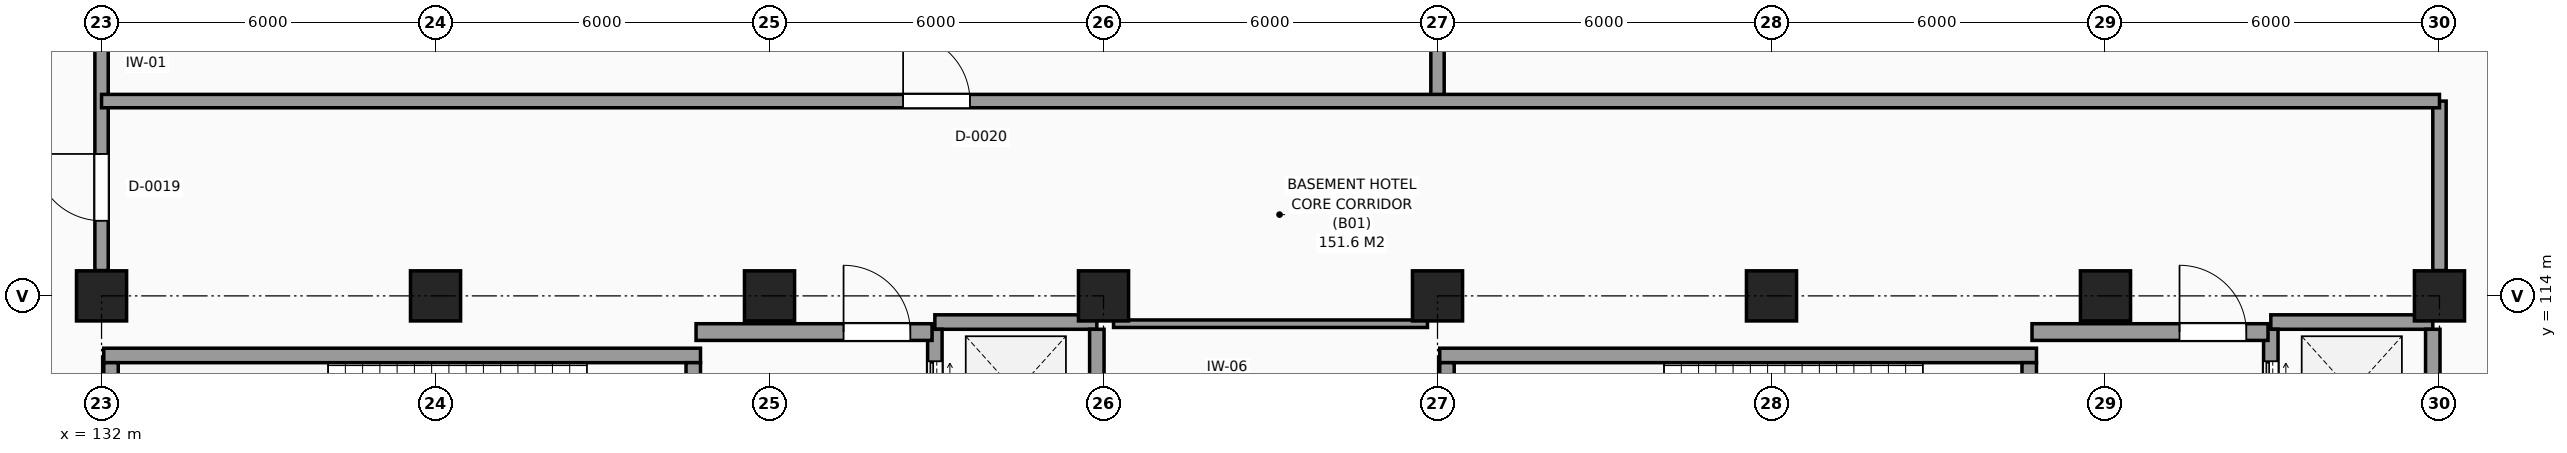
"""IFC4 building model, lengths in metres.
Left out: names, types, materials, properties, quantities, classifications, styles, units other than length and angle.
Written with IfcOpenShell. Run it as: python <this file> out.ifc"""

import sys

from ifc_helpers import new_model, si_unit, direction, frame, frame_2d, origin, origin_2d, place, context, subcontext, project, spatial, rectangle, extrude, element, fill, save


model = new_model("IFC4")
c1 = context("Model", 3, precision=1e-05, world=origin(), true_north=direction((0.0, 1.0)))
c2 = subcontext(c1, "Body", "Model", "MODEL_VIEW")
j1 = project(units=[si_unit("LENGTHUNIT", "METRE"), si_unit("PLANEANGLEUNIT", "RADIAN")], contexts=[c1])
p1 = place(None, origin())
s1 = spatial("IfcSite", under=j1, at=p1, CompositionType="ELEMENT")
p2 = place(p1, origin())
s2 = spatial("IfcBuilding", under=s1, at=p2, CompositionType="ELEMENT")
p3 = place(p2, frame((0.0, 0.0, -4.8)))
s3 = spatial("IfcBuildingStorey", under=s2, at=p3, CompositionType="ELEMENT", Elevation=-4.8)
for number, where, z_axis, x_axis in (
    (1, (132.0, 114.0, 0.0), (0.0, 0.0, 1.0), (1.0, 0.0, 0.0)),
    (2, (138.0, 114.0, 0.0), (0.0, 0.0, 1.0), (1.0, 0.0, 0.0)),
    (3, (144.0, 114.0, 0.0), (0.0, 0.0, 1.0), (1.0, 0.0, 0.0)),
    (4, (150.0, 114.0, 0.0), (0.0, 0.0, 1.0), (1.0, 0.0, 0.0)),
    (5, (156.0, 114.0, 0.0), (0.0, 0.0, 1.0), (1.0, 0.0, 0.0)),
    (6, (162.0, 114.0, 0.0), (0.0, 0.0, 1.0), (1.0, 0.0, 0.0)),
    (7, (168.0, 114.0, 0.0), (0.0, 0.0, 1.0), (1.0, 0.0, 0.0)),
    (8, (174.0, 114.0, 0.0), (0.0, 0.0, 1.0), (1.0, 0.0, 0.0)),
):
    element("IfcColumn", number, at=place(p3, frame(where, z_axis=z_axis, x_axis=x_axis)), inside=s3, PredefinedType="COLUMN", context=c2, shape_type="SweptSolid", body=[
        extrude(rectangle(XDim=0.9, YDim=0.9, at=origin_2d()), origin(), (0.0, 0.0, 1.0), 4.8),
    ])
p4 = place(p3, frame((156.04, 112.93, -0.5), z_axis=(0.0, 0.0, 1.0), x_axis=(1.0, 0.0, 0.0)))
e9 = element("IfcWall", 9, at=p4, inside=s3, PredefinedType="SHEAR", context=c2, shape_type="SweptSolid", body=[
    extrude(rectangle(XDim=10.72, YDim=0.26, at=frame_2d((5.36, 0.0))), origin(), (0.0, 0.0, 1.0), 5.3),
])
p5 = place(p3, frame((156.17, 109.2, -0.5), z_axis=(0.0, 0.0, 1.0), x_axis=(0.0, 1.0, 0.0)))
e10 = element("IfcWall", 10, at=p5, inside=s3, PredefinedType="SHEAR", context=c2, shape_type="SweptSolid", body=[
    extrude(rectangle(XDim=3.6, YDim=0.26, at=frame_2d((1.8, 0.0))), origin(), (0.0, 0.0, 1.0), 5.3),
])
p6 = place(p3, frame((166.63, 109.2, -0.5), z_axis=(0.0, 0.0, 1.0), x_axis=(0.0, 1.0, 0.0)))
e11 = element("IfcWall", 11, at=p6, inside=s3, PredefinedType="SHEAR", context=c2, shape_type="SweptSolid", body=[
    extrude(rectangle(XDim=3.6, YDim=0.26, at=frame_2d((1.8, 0.0))), origin(), (0.0, 0.0, 1.0), 5.3),
])
p7 = place(p6, frame((1.25, 0.0, 0.5)))
e12 = element("IfcOpeningElement", 12, at=p7, cuts=e11, PredefinedType="OPENING", context=c2, shape_type="SweptSolid", body=[
    extrude(rectangle(XDim=1.1, YDim=2.15, at=frame_2d((0.55, 1.075))), frame((0.0, 0.14, 0.0), z_axis=(0.0, -1.0, 0.0), x_axis=(1.0, 0.0, 0.0)), (0.0, 0.0, 1.0), 0.28),
])
p8 = place(p3, frame((170.97, 113.53, -0.5), z_axis=(0.0, 0.0, 1.0), x_axis=(1.0, 0.0, 0.0)))
e13 = element("IfcWall", 13, at=p8, inside=s3, PredefinedType="SHEAR", context=c2, shape_type="SweptSolid", body=[
    extrude(rectangle(XDim=2.91, YDim=0.26, at=frame_2d((1.455, 0.0))), origin(), (0.0, 0.0, 1.0), 5.3),
])
p9 = place(p3, frame((173.88, 111.15, -0.5), z_axis=(0.0, 0.0, 1.0), x_axis=(0.0, 1.0, 0.0)))
e14 = element("IfcWall", 14, at=p9, inside=s3, PredefinedType="SHEAR", context=c2, shape_type="SweptSolid", body=[
    extrude(rectangle(XDim=2.25, YDim=0.26, at=frame_2d((1.125, 0.0))), origin(), (0.0, 0.0, 1.0), 5.3),
])
p10 = place(p3, frame((170.97, 111.15, -0.5), z_axis=(0.0, 0.0, 1.0), x_axis=(0.0, 1.0, 0.0)))
e15 = element("IfcWall", 15, at=p10, inside=s3, PredefinedType="SHEAR", context=c2, shape_type="SweptSolid", body=[
    extrude(rectangle(XDim=2.25, YDim=0.26, at=frame_2d((1.125, 0.0))), origin(), (0.0, 0.0, 1.0), 5.3),
])
p11 = place(p10, frame((0.575, 0.0, 0.5)))
e16 = element("IfcOpeningElement", 16, at=p11, cuts=e15, PredefinedType="OPENING", context=c2, shape_type="SweptSolid", body=[
    extrude(rectangle(XDim=1.1, YDim=2.2, at=frame_2d((0.55, 1.1))), frame((0.0, 0.14, 0.0), z_axis=(0.0, -1.0, 0.0), x_axis=(1.0, 0.0, 0.0)), (0.0, 0.0, 1.0), 0.28),
])
p12 = place(p3, frame((166.68, 113.35, -0.5), z_axis=(0.0, 0.0, 1.0), x_axis=(1.0, 0.0, 0.0)))
e17 = element("IfcWall", 17, at=p12, inside=s3, PredefinedType="SHEAR", context=c2, shape_type="SweptSolid", body=[
    extrude(rectangle(XDim=4.24, YDim=0.3, at=frame_2d((2.12, 0.0))), origin(), (0.0, 0.0, 1.0), 5.3),
])
p13 = place(p12, frame((2.65, 0.0, 0.5)))
e18 = element("IfcOpeningElement", 18, at=p13, cuts=e17, PredefinedType="OPENING", context=c2, shape_type="SweptSolid", body=[
    extrude(rectangle(XDim=1.2, YDim=2.2, at=frame_2d((0.6, 1.1))), frame((0.0, 0.16, 0.0), z_axis=(0.0, -1.0, 0.0), x_axis=(1.0, 0.0, 0.0)), (0.0, 0.0, 1.0), 0.32),
])
p14 = place(p3, frame((132.04, 112.93, -0.5), z_axis=(0.0, 0.0, 1.0), x_axis=(1.0, 0.0, 0.0)))
e19 = element("IfcWall", 19, at=p14, inside=s3, PredefinedType="SHEAR", context=c2, shape_type="SweptSolid", body=[
    extrude(rectangle(XDim=10.72, YDim=0.26, at=frame_2d((5.36, 0.0))), origin(), (0.0, 0.0, 1.0), 5.3),
])
p15 = place(p3, frame((132.17, 109.2, -0.5), z_axis=(0.0, 0.0, 1.0), x_axis=(0.0, 1.0, 0.0)))
e20 = element("IfcWall", 20, at=p15, inside=s3, PredefinedType="SHEAR", context=c2, shape_type="SweptSolid", body=[
    extrude(rectangle(XDim=3.6, YDim=0.26, at=frame_2d((1.8, 0.0))), origin(), (0.0, 0.0, 1.0), 5.3),
])
p16 = place(p3, frame((142.63, 109.2, -0.5), z_axis=(0.0, 0.0, 1.0), x_axis=(0.0, 1.0, 0.0)))
e21 = element("IfcWall", 21, at=p16, inside=s3, PredefinedType="SHEAR", context=c2, shape_type="SweptSolid", body=[
    extrude(rectangle(XDim=3.6, YDim=0.26, at=frame_2d((1.8, 0.0))), origin(), (0.0, 0.0, 1.0), 5.3),
])
p17 = place(p16, frame((1.25, 0.0, 0.5)))
e22 = element("IfcOpeningElement", 22, at=p17, cuts=e21, PredefinedType="OPENING", context=c2, shape_type="SweptSolid", body=[
    extrude(rectangle(XDim=1.1, YDim=2.15, at=frame_2d((0.55, 1.075))), frame((0.0, 0.14, 0.0), z_axis=(0.0, -1.0, 0.0), x_axis=(1.0, 0.0, 0.0)), (0.0, 0.0, 1.0), 0.28),
])
p18 = place(p3, frame((146.97, 113.53, -0.5), z_axis=(0.0, 0.0, 1.0), x_axis=(1.0, 0.0, 0.0)))
e23 = element("IfcWall", 23, at=p18, inside=s3, PredefinedType="SHEAR", context=c2, shape_type="SweptSolid", body=[
    extrude(rectangle(XDim=2.91, YDim=0.26, at=frame_2d((1.455, 0.0))), origin(), (0.0, 0.0, 1.0), 5.3),
])
p19 = place(p3, frame((149.88, 111.15, -0.5), z_axis=(0.0, 0.0, 1.0), x_axis=(0.0, 1.0, 0.0)))
e24 = element("IfcWall", 24, at=p19, inside=s3, PredefinedType="SHEAR", context=c2, shape_type="SweptSolid", body=[
    extrude(rectangle(XDim=2.25, YDim=0.26, at=frame_2d((1.125, 0.0))), origin(), (0.0, 0.0, 1.0), 5.3),
])
p20 = place(p3, frame((146.97, 111.15, -0.5), z_axis=(0.0, 0.0, 1.0), x_axis=(0.0, 1.0, 0.0)))
e25 = element("IfcWall", 25, at=p20, inside=s3, PredefinedType="SHEAR", context=c2, shape_type="SweptSolid", body=[
    extrude(rectangle(XDim=2.25, YDim=0.26, at=frame_2d((1.125, 0.0))), origin(), (0.0, 0.0, 1.0), 5.3),
])
p21 = place(p20, frame((0.575, 0.0, 0.5)))
e26 = element("IfcOpeningElement", 26, at=p21, cuts=e25, PredefinedType="OPENING", context=c2, shape_type="SweptSolid", body=[
    extrude(rectangle(XDim=1.1, YDim=2.2, at=frame_2d((0.55, 1.1))), frame((0.0, 0.14, 0.0), z_axis=(0.0, -1.0, 0.0), x_axis=(1.0, 0.0, 0.0)), (0.0, 0.0, 1.0), 0.28),
])
p22 = place(p3, frame((142.68, 113.35, -0.5), z_axis=(0.0, 0.0, 1.0), x_axis=(1.0, 0.0, 0.0)))
e27 = element("IfcWall", 27, at=p22, inside=s3, PredefinedType="SHEAR", context=c2, shape_type="SweptSolid", body=[
    extrude(rectangle(XDim=4.24, YDim=0.3, at=frame_2d((2.12, 0.0))), origin(), (0.0, 0.0, 1.0), 5.3),
])
p23 = place(p22, frame((2.65, 0.0, 0.5)))
e28 = element("IfcOpeningElement", 28, at=p23, cuts=e27, PredefinedType="OPENING", context=c2, shape_type="SweptSolid", body=[
    extrude(rectangle(XDim=1.2, YDim=2.2, at=frame_2d((0.6, 1.1))), frame((0.0, 0.16, 0.0), z_axis=(0.0, -1.0, 0.0), x_axis=(1.0, 0.0, 0.0)), (0.0, 0.0, 1.0), 0.32),
])
p24 = place(p3, frame((132.0, 114.455, 0.0), z_axis=(0.0, 0.0, 1.0), x_axis=(0.0, 1.0, 0.0)))
e29 = element("IfcWall", 29, at=p24, inside=s3, PredefinedType="PARTITIONING", context=c2, shape_type="SweptSolid", body=[
    extrude(rectangle(XDim=5.09, YDim=0.24, at=frame_2d((2.545, 0.0))), origin(), (0.0, 0.0, 1.0), 4.16),
])
p25 = place(p24, frame((0.895, 0.0, 0.0)))
e30 = element("IfcOpeningElement", 30, at=p25, cuts=e29, PredefinedType="OPENING", context=c2, shape_type="SweptSolid", body=[
    extrude(rectangle(XDim=1.2, YDim=2.2, at=frame_2d((0.6, 1.1))), frame((0.0, 0.13, 0.0), z_axis=(0.0, -1.0, 0.0), x_axis=(1.0, 0.0, 0.0)), (0.0, 0.0, 1.0), 0.26),
])
p26 = place(p3, frame((156.0, 117.5, 0.0), z_axis=(0.0, 0.0, 1.0), x_axis=(0.0, 1.0, 0.0)))
e31 = element("IfcWall", 31, at=p26, inside=s3, PredefinedType="PARTITIONING", context=c2, shape_type="SweptSolid", body=[
    extrude(rectangle(XDim=2.045, YDim=0.24, at=frame_2d((1.022, 0.0))), origin(), (0.0, 0.0, 1.0), 4.16),
])
p27 = place(p3, frame((174.0, 114.455, 0.0), z_axis=(0.0, 0.0, 1.0), x_axis=(0.0, 1.0, 0.0)))
e32 = element("IfcWall", 32, at=p27, inside=s3, PredefinedType="PARTITIONING", context=c2, shape_type="SweptSolid", body=[
    extrude(rectangle(XDim=3.045, YDim=0.24, at=frame_2d((1.522, 0.0))), origin(), (0.0, 0.0, 1.0), 4.16),
])
p28 = place(p3, frame((150.18, 113.5, 0.0), z_axis=(0.0, 0.0, 1.0), x_axis=(1.0, 0.0, 0.0)))
e33 = element("IfcWall", 33, at=p28, inside=s3, PredefinedType="PARTITIONING", context=c2, shape_type="SweptSolid", body=[
    extrude(rectangle(XDim=5.64, YDim=0.135, at=frame_2d((2.82, 0.0))), origin(), (0.0, 0.0, 1.0), 4.5),
])
p29 = place(p3, frame((132.0, 117.5, 0.0), z_axis=(0.0, 0.0, 1.0), x_axis=(1.0, 0.0, 0.0)))
e34 = element("IfcWall", 34, at=p29, inside=s3, PredefinedType="PARTITIONING", context=c2, shape_type="SweptSolid", body=[
    extrude(rectangle(XDim=42.0, YDim=0.24, at=frame_2d((21.0, 0.0))), origin(), (0.0, 0.0, 1.0), 4.5),
])
p30 = place(p29, frame((14.4, 0.0, 0.0)))
e35 = element("IfcOpeningElement", 35, at=p30, cuts=e34, PredefinedType="OPENING", context=c2, shape_type="SweptSolid", body=[
    extrude(rectangle(XDim=1.2, YDim=2.2, at=frame_2d((0.6, 1.1))), frame((0.0, 0.13, 0.0), z_axis=(0.0, -1.0, 0.0), x_axis=(1.0, 0.0, 0.0)), (0.0, 0.0, 1.0), 0.26),
])
p31 = place(p11, origin())
e36 = element("IfcDoor", 36, at=p31, inside=s3, OperationType="DOUBLE_DOOR_SLIDING", PredefinedType="DOOR", context=c2, shape_type="SweptSolid", body=[
    extrude(rectangle(XDim=1.1, YDim=2.2, at=frame_2d((0.55, 1.1))), frame((0.0, 0.025, 0.0), z_axis=(0.0, -1.0, 0.0), x_axis=(1.0, 0.0, 0.0)), (0.0, 0.0, 1.0), 0.05),
])
fill(e16, e36)
p32 = place(p13, origin())
e37 = element("IfcDoor", 37, at=p32, inside=s3, OperationType="SINGLE_SWING_LEFT", PredefinedType="DOOR", context=c2, shape_type="SweptSolid", body=[
    extrude(rectangle(XDim=1.2, YDim=2.2, at=frame_2d((0.6, 1.1))), frame((0.0, 0.025, 0.0), z_axis=(0.0, -1.0, 0.0), x_axis=(1.0, 0.0, 0.0)), (0.0, 0.0, 1.0), 0.05),
])
fill(e18, e37)
p33 = place(p21, origin())
e38 = element("IfcDoor", 38, at=p33, inside=s3, OperationType="DOUBLE_DOOR_SLIDING", PredefinedType="DOOR", context=c2, shape_type="SweptSolid", body=[
    extrude(rectangle(XDim=1.1, YDim=2.2, at=frame_2d((0.55, 1.1))), frame((0.0, 0.025, 0.0), z_axis=(0.0, -1.0, 0.0), x_axis=(1.0, 0.0, 0.0)), (0.0, 0.0, 1.0), 0.05),
])
fill(e26, e38)
p34 = place(p23, origin())
e39 = element("IfcDoor", 39, at=p34, inside=s3, OperationType="SINGLE_SWING_LEFT", PredefinedType="DOOR", context=c2, shape_type="SweptSolid", body=[
    extrude(rectangle(XDim=1.2, YDim=2.2, at=frame_2d((0.6, 1.1))), frame((0.0, 0.025, 0.0), z_axis=(0.0, -1.0, 0.0), x_axis=(1.0, 0.0, 0.0)), (0.0, 0.0, 1.0), 0.05),
])
fill(e28, e39)
p35 = place(p25, origin())
e40 = element("IfcDoor", 40, at=p35, inside=s3, OperationType="SINGLE_SWING_RIGHT", PredefinedType="DOOR", context=c2, shape_type="SweptSolid", body=[
    extrude(rectangle(XDim=1.2, YDim=2.2, at=frame_2d((0.6, 1.1))), frame((0.0, 0.025, 0.0), z_axis=(0.0, -1.0, 0.0), x_axis=(1.0, 0.0, 0.0)), (0.0, 0.0, 1.0), 0.05),
])
fill(e30, e40)
p36 = place(p30, origin())
e41 = element("IfcDoor", 41, at=p36, inside=s3, OperationType="SINGLE_SWING_LEFT", PredefinedType="DOOR", context=c2, shape_type="SweptSolid", body=[
    extrude(rectangle(XDim=1.2, YDim=2.2, at=frame_2d((0.6, 1.1))), frame((0.0, 0.025, 0.0), z_axis=(0.0, -1.0, 0.0), x_axis=(1.0, 0.0, 0.0)), (0.0, 0.0, 1.0), 0.05),
])
fill(e35, e41)
save(model, sys.argv[1])
